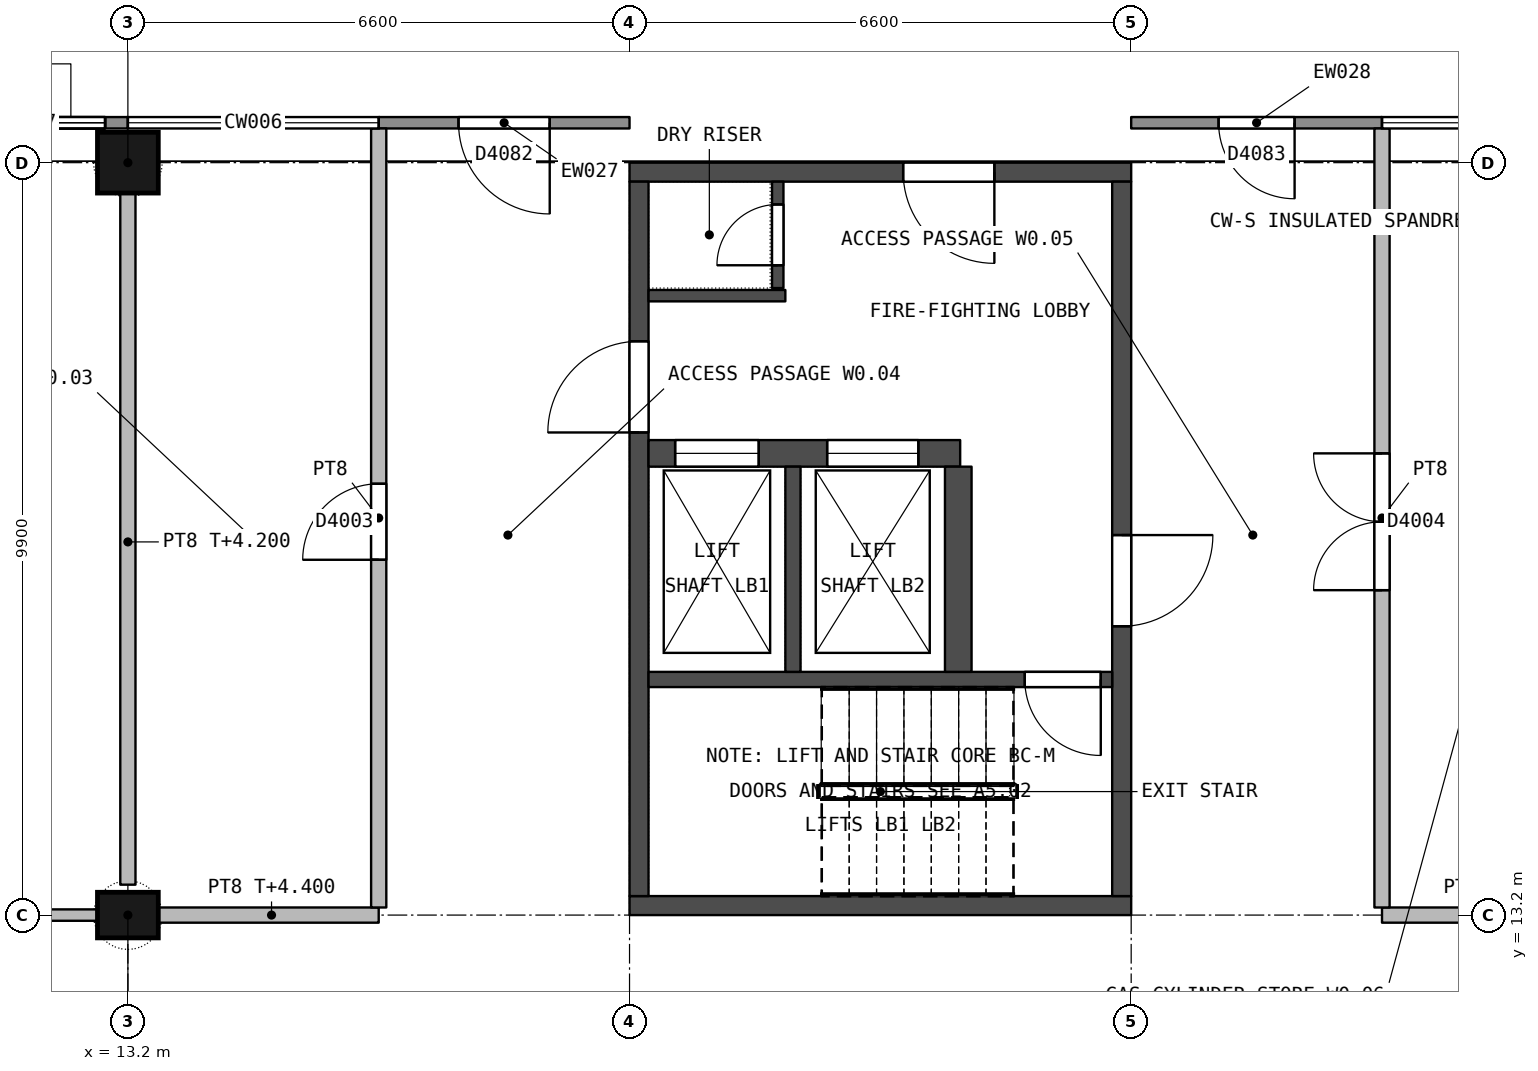
"""IFC4 building model, lengths in metres.
Left out: names, types, materials, properties, quantities, classifications, styles, units other than length and angle.
Written with IfcOpenShell. Run it as: python <this file> out.ifc"""

import sys

from ifc_helpers import new_model, si_unit, direction, frame, frame_2d, origin, origin_2d, place, context, subcontext, project, spatial, rectangle, extrude, element, fill, save


model = new_model("IFC4")
c1 = context("Model", 3, precision=1e-05, world=origin(), true_north=direction((0.0, 1.0)))
c2 = subcontext(c1, "Body", "Model", "MODEL_VIEW")
j1 = project(units=[si_unit("LENGTHUNIT", "METRE"), si_unit("PLANEANGLEUNIT", "RADIAN")], contexts=[c1])
p1 = place(None, origin())
s1 = spatial("IfcSite", under=j1, at=p1, CompositionType="ELEMENT")
p2 = place(p1, origin())
s2 = spatial("IfcBuilding", under=s1, at=p2, CompositionType="ELEMENT")
p3 = place(p2, origin())
s3 = spatial("IfcBuildingStorey", under=s2, at=p3, CompositionType="ELEMENT", Elevation=0.0)
p4 = place(p3, frame((13.2, 13.2, 0.0), z_axis=(0.0, 0.0, 1.0), x_axis=(1.0, 0.0, 0.0)))
e1 = element("IfcColumn", 1, at=p4, inside=s3, PredefinedType="COLUMN", context=c2, shape_type="SweptSolid", body=[
    extrude(rectangle(XDim=0.8, YDim=0.6, at=origin_2d()), origin(), (0.0, 0.0, 1.0), 5.4),
])
p5 = place(p3, frame((13.2, 23.1, 0.0), z_axis=(0.0, 0.0, 1.0), x_axis=(1.0, 0.0, 0.0)))
e2 = element("IfcColumn", 2, at=p5, inside=s3, PredefinedType="COLUMN", context=c2, shape_type="SweptSolid", body=[
    extrude(rectangle(XDim=0.8, YDim=0.8, at=origin_2d()), origin(), (0.0, 0.0, 1.0), 5.4),
])
p6 = place(p3, frame((19.8, 13.325, 0.0), z_axis=(0.0, 0.0, 1.0), x_axis=(1.0, 0.0, 0.0)))
e3 = element("IfcWall", 3, at=p6, inside=s3, PredefinedType="SHEAR", context=c2, shape_type="SweptSolid", body=[
    extrude(rectangle(XDim=6.6, YDim=0.25, at=frame_2d((3.3, 0.0))), origin(), (0.0, 0.0, 1.0), 5.1),
])
p7 = place(p3, frame((19.8, 22.975, 0.0), z_axis=(0.0, 0.0, 1.0), x_axis=(1.0, 0.0, 0.0)))
e4 = element("IfcWall", 4, at=p7, inside=s3, PredefinedType="SHEAR", context=c2, shape_type="SweptSolid", body=[
    extrude(rectangle(XDim=6.6, YDim=0.25, at=frame_2d((3.3, 0.0))), origin(), (0.0, 0.0, 1.0), 5.1),
])
p8 = place(p7, frame((3.6, 0.0, 0.0)))
e5 = element("IfcOpeningElement", 5, at=p8, cuts=e4, PredefinedType="OPENING", context=c2, shape_type="SweptSolid", body=[
    extrude(rectangle(XDim=1.2, YDim=2.4, at=frame_2d((0.6, 1.2))), frame((0.0, 0.135, 0.0), z_axis=(0.0, -1.0, 0.0), x_axis=(1.0, 0.0, 0.0)), (0.0, 0.0, 1.0), 0.27),
])
p9 = place(p3, frame((19.925, 13.45, 0.0), z_axis=(0.0, 0.0, 1.0), x_axis=(0.0, 1.0, 0.0)))
e6 = element("IfcWall", 6, at=p9, inside=s3, PredefinedType="SHEAR", context=c2, shape_type="SweptSolid", body=[
    extrude(rectangle(XDim=9.4, YDim=0.25, at=frame_2d((4.7, 0.0))), origin(), (0.0, 0.0, 1.0), 5.1),
])
p10 = place(p9, frame((6.1, 0.0, 0.0)))
e7 = element("IfcOpeningElement", 7, at=p10, cuts=e6, PredefinedType="OPENING", context=c2, shape_type="SweptSolid", body=[
    extrude(rectangle(XDim=1.2, YDim=2.1, at=frame_2d((0.6, 1.05))), frame((0.0, 0.135, 0.0), z_axis=(0.0, -1.0, 0.0), x_axis=(1.0, 0.0, 0.0)), (0.0, 0.0, 1.0), 0.27),
])
p11 = place(p3, frame((26.275, 13.45, 0.0), z_axis=(0.0, 0.0, 1.0), x_axis=(0.0, 1.0, 0.0)))
e8 = element("IfcWall", 8, at=p11, inside=s3, PredefinedType="SHEAR", context=c2, shape_type="SweptSolid", body=[
    extrude(rectangle(XDim=9.4, YDim=0.25, at=frame_2d((4.7, 0.0))), origin(), (0.0, 0.0, 1.0), 5.1),
])
p12 = place(p11, frame((3.55, 0.0, 0.0)))
e9 = element("IfcOpeningElement", 9, at=p12, cuts=e8, PredefinedType="OPENING", context=c2, shape_type="SweptSolid", body=[
    extrude(rectangle(XDim=1.2, YDim=2.1, at=frame_2d((0.6, 1.05))), frame((0.0, 0.135, 0.0), z_axis=(0.0, -1.0, 0.0), x_axis=(1.0, 0.0, 0.0)), (0.0, 0.0, 1.0), 0.27),
])
p13 = place(p3, frame((20.05, 16.3, 0.0), z_axis=(0.0, 0.0, 1.0), x_axis=(1.0, 0.0, 0.0)))
e10 = element("IfcWall", 10, at=p13, inside=s3, PredefinedType="SHEAR", context=c2, shape_type="SweptSolid", body=[
    extrude(rectangle(XDim=6.1, YDim=0.2, at=frame_2d((3.05, 0.0))), origin(), (0.0, 0.0, 1.0), 5.1),
])
p14 = place(p13, frame((4.95, 0.0, 0.0)))
e11 = element("IfcOpeningElement", 11, at=p14, cuts=e10, PredefinedType="OPENING", context=c2, shape_type="SweptSolid", body=[
    extrude(rectangle(XDim=1.0, YDim=2.2, at=frame_2d((0.5, 1.1))), frame((0.0, 0.11, 0.0), z_axis=(0.0, -1.0, 0.0), x_axis=(1.0, 0.0, 0.0)), (0.0, 0.0, 1.0), 0.22),
])
p15 = place(p3, frame((20.05, 19.275, 0.0), z_axis=(0.0, 0.0, 1.0), x_axis=(1.0, 0.0, 0.0)))
e12 = element("IfcWall", 12, at=p15, inside=s3, PredefinedType="SHEAR", context=c2, shape_type="SweptSolid", body=[
    extrude(rectangle(XDim=4.1, YDim=0.35, at=frame_2d((2.05, 0.0))), origin(), (0.0, 0.0, 1.0), 5.1),
])
p16 = place(p15, frame((0.35, 0.0, 0.0)))
e13 = element("IfcOpeningElement", 13, at=p16, cuts=e12, PredefinedType="OPENING", context=c2, shape_type="SweptSolid", body=[
    extrude(rectangle(XDim=1.1, YDim=2.2, at=frame_2d((0.55, 1.1))), frame((0.0, 0.185, 0.0), z_axis=(0.0, -1.0, 0.0), x_axis=(1.0, 0.0, 0.0)), (0.0, 0.0, 1.0), 0.37),
])
p17 = place(p15, frame((2.35, 0.0, 0.0)))
e14 = element("IfcOpeningElement", 14, at=p17, cuts=e12, PredefinedType="OPENING", context=c2, shape_type="SweptSolid", body=[
    extrude(rectangle(XDim=1.2, YDim=2.3, at=frame_2d((0.6, 1.15))), frame((0.0, 0.185, 0.0), z_axis=(0.0, -1.0, 0.0), x_axis=(1.0, 0.0, 0.0)), (0.0, 0.0, 1.0), 0.37),
])
p18 = place(p3, frame((21.95, 16.4, 0.0), z_axis=(0.0, 0.0, 1.0), x_axis=(0.0, 1.0, 0.0)))
e15 = element("IfcWall", 15, at=p18, inside=s3, PredefinedType="SHEAR", context=c2, shape_type="SweptSolid", body=[
    extrude(rectangle(XDim=2.7, YDim=0.2, at=frame_2d((1.35, 0.0))), origin(), (0.0, 0.0, 1.0), 5.1),
])
p19 = place(p3, frame((24.125, 16.4, 0.0), z_axis=(0.0, 0.0, 1.0), x_axis=(0.0, 1.0, 0.0)))
e16 = element("IfcWall", 16, at=p19, inside=s3, PredefinedType="SHEAR", context=c2, shape_type="SweptSolid", body=[
    extrude(rectangle(XDim=2.7, YDim=0.35, at=frame_2d((1.35, 0.0))), origin(), (0.0, 0.0, 1.0), 5.1),
])
p20 = place(p3, frame((20.05, 21.35, 0.0), z_axis=(0.0, 0.0, 1.0), x_axis=(1.0, 0.0, 0.0)))
e17 = element("IfcWall", 17, at=p20, inside=s3, PredefinedType="SHEAR", context=c2, shape_type="SweptSolid", body=[
    extrude(rectangle(XDim=1.8, YDim=0.15, at=frame_2d((0.9, 0.0))), origin(), (0.0, 0.0, 1.0), 5.1),
])
p21 = place(p3, frame((21.75, 21.45, 0.0), z_axis=(0.0, 0.0, 1.0), x_axis=(0.0, 1.0, 0.0)))
e18 = element("IfcWall", 18, at=p21, inside=s3, PredefinedType="SHEAR", context=c2, shape_type="SweptSolid", body=[
    extrude(rectangle(XDim=1.4, YDim=0.15, at=frame_2d((0.7, 0.0))), origin(), (0.0, 0.0, 1.0), 5.1),
])
p22 = place(p21, frame((0.3, 0.0, 0.0)))
e19 = element("IfcOpeningElement", 19, at=p22, cuts=e18, PredefinedType="OPENING", context=c2, shape_type="SweptSolid", body=[
    extrude(rectangle(XDim=0.8, YDim=2.0, at=frame_2d((0.4, 1.0))), frame((0.0, 0.085, 0.0), z_axis=(0.0, -1.0, 0.0), x_axis=(1.0, 0.0, 0.0)), (0.0, 0.0, 1.0), 0.17),
])
p23 = place(p3, frame((6.6, 23.625, 0.0), z_axis=(0.0, 0.0, 1.0), x_axis=(1.0, 0.0, 0.0)))
e20 = element("IfcWall", 20, at=p23, inside=s3, PredefinedType="STANDARD", context=c2, shape_type="SweptSolid", body=[
    extrude(rectangle(XDim=6.6, YDim=0.15, at=frame_2d((3.3, 0.0))), origin(), (0.0, 0.0, 1.0), 5.1),
])
p24 = place(p23, frame((2.25, 0.0, 0.0)))
e21 = element("IfcOpeningElement", 21, at=p24, cuts=e20, PredefinedType="OPENING", context=c2, shape_type="SweptSolid", body=[
    extrude(rectangle(XDim=2.1, YDim=2.4, at=frame_2d((1.05, 1.2))), frame((0.0, 0.085, 0.0), z_axis=(0.0, -1.0, 0.0), x_axis=(1.0, 0.0, 0.0)), (0.0, 0.0, 1.0), 0.17),
])
p25 = place(p23, frame((0.3, 0.0, 0.1)))
e22 = element("IfcOpeningElement", 22, at=p25, cuts=e20, PredefinedType="OPENING", context=c2, shape_type="SweptSolid", body=[
    extrude(rectangle(XDim=1.75, YDim=2.3, at=frame_2d((0.875, 1.15))), frame((0.0, 0.085, 0.0), z_axis=(0.0, -1.0, 0.0), x_axis=(1.0, 0.0, 0.0)), (0.0, 0.0, 1.0), 0.17),
])
p26 = place(p23, frame((4.55, 0.0, 0.1)))
e23 = element("IfcOpeningElement", 23, at=p26, cuts=e20, PredefinedType="OPENING", context=c2, shape_type="SweptSolid", body=[
    extrude(rectangle(XDim=1.75, YDim=2.3, at=frame_2d((0.875, 1.15))), frame((0.0, 0.085, 0.0), z_axis=(0.0, -1.0, 0.0), x_axis=(1.0, 0.0, 0.0)), (0.0, 0.0, 1.0), 0.17),
])
p27 = place(p23, frame((0.3, 0.0, 2.55)))
e24 = element("IfcOpeningElement", 24, at=p27, cuts=e20, PredefinedType="OPENING", context=c2, shape_type="SweptSolid", body=[
    extrude(rectangle(XDim=6.0, YDim=2.4, at=frame_2d((3.0, 1.2))), frame((0.0, 0.085, 0.0), z_axis=(0.0, -1.0, 0.0), x_axis=(1.0, 0.0, 0.0)), (0.0, 0.0, 1.0), 0.17),
])
p28 = place(p3, frame((16.5, 23.625, 0.0), z_axis=(0.0, 0.0, 1.0), x_axis=(1.0, 0.0, 0.0)))
e25 = element("IfcWall", 25, at=p28, inside=s3, PredefinedType="STANDARD", context=c2, shape_type="SweptSolid", body=[
    extrude(rectangle(XDim=3.3, YDim=0.15, at=frame_2d((1.65, 0.0))), origin(), (0.0, 0.0, 1.0), 5.1),
])
p29 = place(p28, frame((1.05, 0.0, 0.0)))
e26 = element("IfcOpeningElement", 26, at=p29, cuts=e25, PredefinedType="OPENING", context=c2, shape_type="SweptSolid", body=[
    extrude(rectangle(XDim=1.2, YDim=2.1, at=frame_2d((0.6, 1.05))), frame((0.0, 0.085, 0.0), z_axis=(0.0, -1.0, 0.0), x_axis=(1.0, 0.0, 0.0)), (0.0, 0.0, 1.0), 0.17),
])
p30 = place(p3, frame((26.4, 23.625, 0.0), z_axis=(0.0, 0.0, 1.0), x_axis=(1.0, 0.0, 0.0)))
e27 = element("IfcWall", 27, at=p30, inside=s3, PredefinedType="STANDARD", context=c2, shape_type="SweptSolid", body=[
    extrude(rectangle(XDim=3.3, YDim=0.15, at=frame_2d((1.65, 0.0))), origin(), (0.0, 0.0, 1.0), 5.1),
])
p31 = place(p30, frame((1.15, 0.0, 0.0)))
e28 = element("IfcOpeningElement", 28, at=p31, cuts=e27, PredefinedType="OPENING", context=c2, shape_type="SweptSolid", body=[
    extrude(rectangle(XDim=1.0, YDim=2.1, at=frame_2d((0.5, 1.05))), frame((0.0, 0.085, 0.0), z_axis=(0.0, -1.0, 0.0), x_axis=(1.0, 0.0, 0.0)), (0.0, 0.0, 1.0), 0.17),
])
p32 = place(p3, frame((6.6, 13.2, 0.0), z_axis=(0.0, 0.0, 1.0), x_axis=(1.0, 0.0, 0.0)))
e29 = element("IfcWall", 29, at=p32, inside=s3, PredefinedType="PARTITIONING", context=c2, shape_type="SweptSolid", body=[
    extrude(rectangle(XDim=6.2, YDim=0.15, at=frame_2d((3.1, 0.0))), origin(), (0.0, 0.0, 1.0), 4.4),
])
p33 = place(p32, frame((2.3, 0.0, 0.0)))
e30 = element("IfcOpeningElement", 30, at=p33, cuts=e29, PredefinedType="OPENING", context=c2, shape_type="SweptSolid", body=[
    extrude(rectangle(XDim=2.0, YDim=2.4, at=frame_2d((1.0, 1.2))), frame((0.0, 0.085, 0.0), z_axis=(0.0, -1.0, 0.0), x_axis=(1.0, 0.0, 0.0)), (0.0, 0.0, 1.0), 0.17),
])
p34 = place(p3, frame((16.5, 13.2, 0.0), z_axis=(0.0, 0.0, 1.0), x_axis=(-1.0, 0.0, 0.0)))
e31 = element("IfcWall", 31, at=p34, inside=s3, PredefinedType="PARTITIONING", context=c2, shape_type="SweptSolid", body=[
    extrude(rectangle(XDim=2.9, YDim=0.2, at=frame_2d((1.45, 0.0))), origin(), (0.0, 0.0, 1.0), 4.4),
])
p35 = place(p3, frame((33.0, 13.2, 0.0), z_axis=(0.0, 0.0, 1.0), x_axis=(-1.0, 0.0, 0.0)))
e32 = element("IfcWall", 32, at=p35, inside=s3, PredefinedType="PARTITIONING", context=c2, shape_type="SweptSolid", body=[
    extrude(rectangle(XDim=3.3, YDim=0.2, at=frame_2d((1.65, 0.0))), origin(), (0.0, 0.0, 1.0), 4.4),
])
p36 = place(p3, frame((13.2, 13.6, 0.0), z_axis=(0.0, 0.0, 1.0), x_axis=(0.0, 1.0, 0.0)))
e33 = element("IfcWall", 33, at=p36, inside=s3, PredefinedType="PARTITIONING", context=c2, shape_type="SweptSolid", body=[
    extrude(rectangle(XDim=9.1, YDim=0.2, at=frame_2d((4.55, 0.0))), origin(), (0.0, 0.0, 1.0), 4.2),
])
p37 = place(p3, frame((16.5, 23.55, 0.0), z_axis=(0.0, 0.0, 1.0), x_axis=(0.0, -1.0, 0.0)))
e34 = element("IfcWall", 34, at=p37, inside=s3, PredefinedType="PARTITIONING", context=c2, shape_type="SweptSolid", body=[
    extrude(rectangle(XDim=10.25, YDim=0.2, at=frame_2d((5.125, 0.0))), origin(), (0.0, 0.0, 1.0), 5.1),
])
p38 = place(p37, frame((4.675, 0.0, 0.0)))
e35 = element("IfcOpeningElement", 35, at=p38, cuts=e34, PredefinedType="OPENING", context=c2, shape_type="SweptSolid", body=[
    extrude(rectangle(XDim=1.0, YDim=2.1, at=frame_2d((0.5, 1.05))), frame((0.0, 0.11, 0.0), z_axis=(0.0, -1.0, 0.0), x_axis=(1.0, 0.0, 0.0)), (0.0, 0.0, 1.0), 0.22),
])
p39 = place(p3, frame((29.7, 13.3, 0.0), z_axis=(0.0, 0.0, 1.0), x_axis=(0.0, 1.0, 0.0)))
e36 = element("IfcWall", 36, at=p39, inside=s3, PredefinedType="PARTITIONING", context=c2, shape_type="SweptSolid", body=[
    extrude(rectangle(XDim=10.25, YDim=0.2, at=frame_2d((5.125, 0.0))), origin(), (0.0, 0.0, 1.0), 5.1),
])
p40 = place(p39, frame((4.175, 0.0, 0.0)))
e37 = element("IfcOpeningElement", 37, at=p40, cuts=e36, PredefinedType="OPENING", context=c2, shape_type="SweptSolid", body=[
    extrude(rectangle(XDim=1.8, YDim=2.4, at=frame_2d((0.9, 1.2))), frame((0.0, 0.11, 0.0), z_axis=(0.0, -1.0, 0.0), x_axis=(1.0, 0.0, 0.0)), (0.0, 0.0, 1.0), 0.22),
])
p41 = place(p12, origin())
e38 = element("IfcDoor", 38, at=p41, inside=s3, OperationType="SINGLE_SWING_RIGHT", PredefinedType="DOOR", context=c2, shape_type="SweptSolid", body=[
    extrude(rectangle(XDim=1.2, YDim=2.1, at=frame_2d((0.6, 1.05))), frame((0.0, 0.025, 0.0), z_axis=(0.0, -1.0, 0.0), x_axis=(1.0, 0.0, 0.0)), (0.0, 0.0, 1.0), 0.05),
])
fill(e9, e38)
p42 = place(p10, origin())
e39 = element("IfcDoor", 39, at=p42, inside=s3, OperationType="SINGLE_SWING_LEFT", PredefinedType="DOOR", context=c2, shape_type="SweptSolid", body=[
    extrude(rectangle(XDim=1.2, YDim=2.1, at=frame_2d((0.6, 1.05))), frame((0.0, 0.025, 0.0), z_axis=(0.0, -1.0, 0.0), x_axis=(1.0, 0.0, 0.0)), (0.0, 0.0, 1.0), 0.05),
])
fill(e7, e39)
p43 = place(p8, origin())
e40 = element("IfcDoor", 40, at=p43, inside=s3, OperationType="SINGLE_SWING_RIGHT", PredefinedType="DOOR", context=c2, shape_type="SweptSolid", body=[
    extrude(rectangle(XDim=1.2, YDim=2.4, at=frame_2d((0.6, 1.2))), frame((0.0, 0.025, 0.0), z_axis=(0.0, -1.0, 0.0), x_axis=(1.0, 0.0, 0.0)), (0.0, 0.0, 1.0), 0.05),
])
fill(e5, e40)
p44 = place(p14, origin())
e41 = element("IfcDoor", 41, at=p44, inside=s3, OperationType="SINGLE_SWING_RIGHT", PredefinedType="DOOR", context=c2, shape_type="SweptSolid", body=[
    extrude(rectangle(XDim=1.0, YDim=2.2, at=frame_2d((0.5, 1.1))), frame((0.0, 0.025, 0.0), z_axis=(0.0, -1.0, 0.0), x_axis=(1.0, 0.0, 0.0)), (0.0, 0.0, 1.0), 0.05),
])
fill(e11, e41)
p45 = place(p22, origin())
e42 = element("IfcDoor", 42, at=p45, inside=s3, OperationType="SINGLE_SWING_LEFT", PredefinedType="DOOR", context=c2, shape_type="SweptSolid", body=[
    extrude(rectangle(XDim=0.8, YDim=2.0, at=frame_2d((0.4, 1.0))), frame((0.0, 0.025, 0.0), z_axis=(0.0, -1.0, 0.0), x_axis=(1.0, 0.0, 0.0)), (0.0, 0.0, 1.0), 0.05),
])
fill(e19, e42)
p46 = place(p16, origin())
e43 = element("IfcDoor", 43, at=p46, inside=s3, OperationType="DOUBLE_DOOR_SLIDING", PredefinedType="NOTDEFINED", context=c2, shape_type="SweptSolid", body=[
    extrude(rectangle(XDim=1.1, YDim=2.2, at=frame_2d((0.55, 1.1))), frame((0.0, 0.025, 0.0), z_axis=(0.0, -1.0, 0.0), x_axis=(1.0, 0.0, 0.0)), (0.0, 0.0, 1.0), 0.05),
])
fill(e13, e43)
p47 = place(p17, origin())
e44 = element("IfcDoor", 44, at=p47, inside=s3, OperationType="DOUBLE_DOOR_SLIDING", PredefinedType="NOTDEFINED", context=c2, shape_type="SweptSolid", body=[
    extrude(rectangle(XDim=1.2, YDim=2.3, at=frame_2d((0.6, 1.15))), frame((0.0, 0.025, 0.0), z_axis=(0.0, -1.0, 0.0), x_axis=(1.0, 0.0, 0.0)), (0.0, 0.0, 1.0), 0.05),
])
fill(e14, e44)
p48 = place(p26, origin())
e45 = element("IfcWindow", 45, at=p48, inside=s3, PartitioningType="SINGLE_PANEL", PredefinedType="WINDOW", context=c2, shape_type="SweptSolid", body=[
    extrude(rectangle(XDim=1.75, YDim=2.3, at=frame_2d((0.875, 1.15))), frame((0.0, 0.03, 0.0), z_axis=(0.0, -1.0, 0.0), x_axis=(1.0, 0.0, 0.0)), (0.0, 0.0, 1.0), 0.06),
])
fill(e23, e45)
p49 = place(p27, origin())
e46 = element("IfcWindow", 46, at=p49, inside=s3, PartitioningType="SINGLE_PANEL", PredefinedType="WINDOW", context=c2, shape_type="SweptSolid", body=[
    extrude(rectangle(XDim=6.0, YDim=2.4, at=frame_2d((3.0, 1.2))), frame((0.0, 0.03, 0.0), z_axis=(0.0, -1.0, 0.0), x_axis=(1.0, 0.0, 0.0)), (0.0, 0.0, 1.0), 0.06),
])
fill(e24, e46)
p50 = place(p29, origin())
e47 = element("IfcDoor", 47, at=p50, inside=s3, OperationType="SINGLE_SWING_RIGHT", PredefinedType="DOOR", context=c2, shape_type="SweptSolid", body=[
    extrude(rectangle(XDim=1.2, YDim=2.1, at=frame_2d((0.6, 1.05))), frame((0.0, 0.025, 0.0), z_axis=(0.0, -1.0, 0.0), x_axis=(1.0, 0.0, 0.0)), (0.0, 0.0, 1.0), 0.05),
])
fill(e26, e47)
p51 = place(p31, origin())
e48 = element("IfcDoor", 48, at=p51, inside=s3, OperationType="SINGLE_SWING_RIGHT", PredefinedType="DOOR", context=c2, shape_type="SweptSolid", body=[
    extrude(rectangle(XDim=1.0, YDim=2.1, at=frame_2d((0.5, 1.05))), frame((0.0, 0.025, 0.0), z_axis=(0.0, -1.0, 0.0), x_axis=(1.0, 0.0, 0.0)), (0.0, 0.0, 1.0), 0.05),
])
fill(e28, e48)
p52 = place(p38, origin())
e49 = element("IfcDoor", 49, at=p52, inside=s3, OperationType="SINGLE_SWING_RIGHT", PredefinedType="DOOR", context=c2, shape_type="SweptSolid", body=[
    extrude(rectangle(XDim=1.0, YDim=2.1, at=frame_2d((0.5, 1.05))), frame((0.0, 0.03, 0.0), z_axis=(0.0, -1.0, 0.0), x_axis=(1.0, 0.0, 0.0)), (0.0, 0.0, 1.0), 0.06),
])
fill(e35, e49)
p53 = place(p40, origin())
e50 = element("IfcDoor", 50, at=p53, inside=s3, OperationType="DOUBLE_DOOR_SINGLE_SWING", PredefinedType="DOOR", context=c2, shape_type="SweptSolid", body=[
    extrude(rectangle(XDim=1.8, YDim=2.4, at=frame_2d((0.9, 1.2))), frame((0.0, 0.03, 0.0), z_axis=(0.0, -1.0, 0.0), x_axis=(1.0, 0.0, 0.0)), (0.0, 0.0, 1.0), 0.06),
])
fill(e37, e50)
save(model, sys.argv[1])
